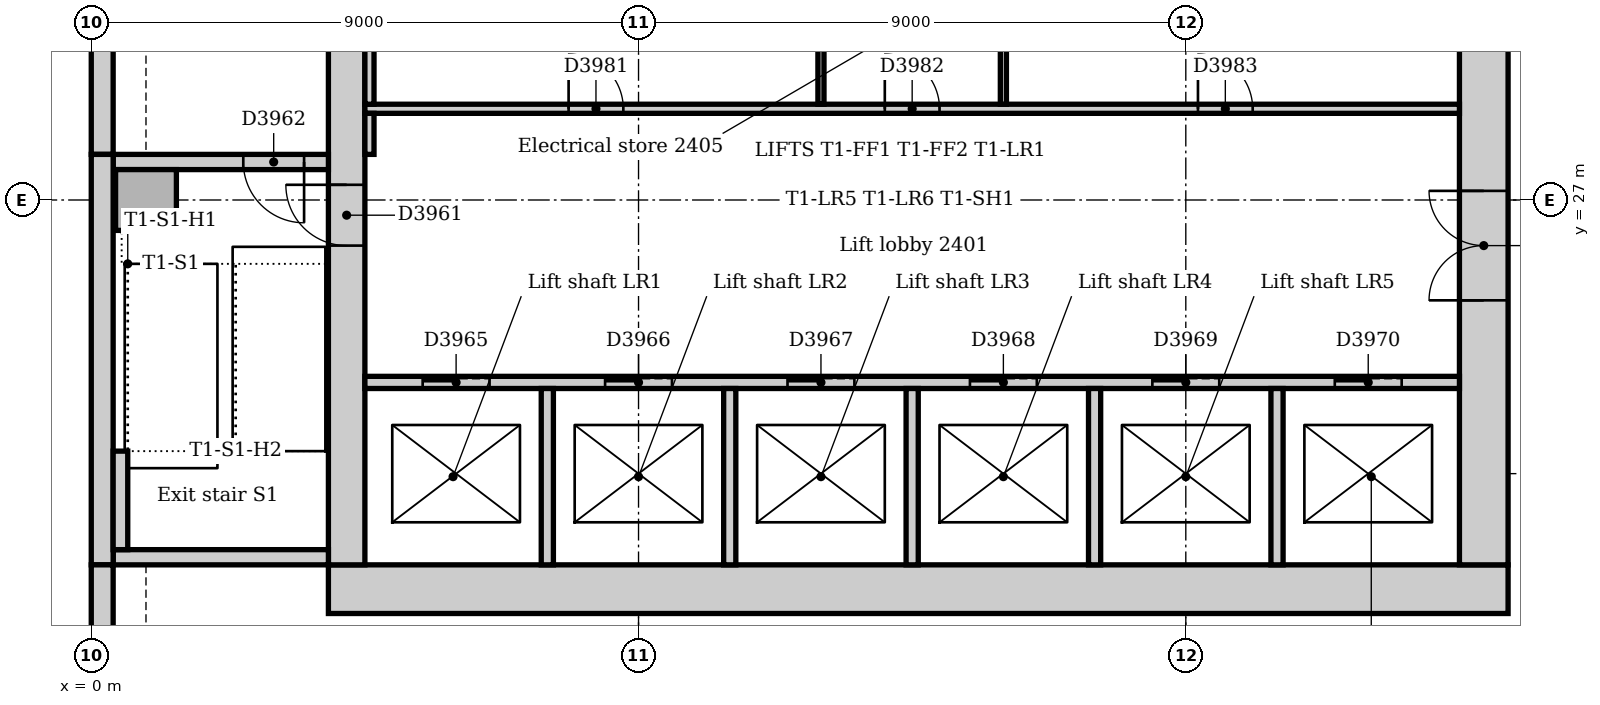
"""IFC4 building model, lengths in metres.
Left out: names, types, materials, properties, quantities, classifications, styles, units other than length and angle.
Written with IfcOpenShell. Run it as: python <this file> out.ifc"""

import sys

from ifc_helpers import new_model, si_unit, direction, frame, frame_2d, origin, origin_2d, place, context, subcontext, project, spatial, rectangle, extrude, element, fill, save


model = new_model("IFC4")
c1 = context("Model", 3, precision=1e-05, world=origin(), true_north=direction((0.0, 1.0)))
c2 = subcontext(c1, "Body", "Model", "MODEL_VIEW")
j1 = project(units=[si_unit("LENGTHUNIT", "METRE"), si_unit("PLANEANGLEUNIT", "RADIAN")], contexts=[c1])
p1 = place(None, origin())
s1 = spatial("IfcSite", under=j1, at=p1, CompositionType="ELEMENT")
p2 = place(p1, origin())
s2 = spatial("IfcBuilding", under=s1, at=p2, CompositionType="ELEMENT")
p3 = place(p2, frame((0.0, 0.0, 104.0)))
s3 = spatial("IfcBuildingStorey", under=s2, at=p3, CompositionType="ELEMENT", Elevation=104.0)
p4 = place(p3, frame((3.9, 20.6, 0.0), z_axis=(0.0, 0.0, 1.0), x_axis=(1.0, 0.0, 0.0)))
e1 = element("IfcWall", 1, at=p4, inside=s3, PredefinedType="SOLIDWALL", context=c2, shape_type="SweptSolid", body=[
    extrude(rectangle(XDim=19.4, YDim=0.8, at=frame_2d((9.7, 0.0))), origin(), (0.0, 0.0, 1.0), 4.0),
])
p5 = place(p3, frame((22.9, 21.0, 0.0), z_axis=(0.0, 0.0, 1.0), x_axis=(0.0, 1.0, 0.0)))
e2 = element("IfcWall", 2, at=p5, inside=s3, PredefinedType="SOLIDWALL", context=c2, shape_type="SweptSolid", body=[
    extrude(rectangle(XDim=10.5, YDim=0.8, at=frame_2d((5.25, 0.0))), origin(), (0.0, 0.0, 1.0), 4.0),
])
p6 = place(p5, frame((4.35, 0.0, 0.0)))
e3 = element("IfcOpeningElement", 3, at=p6, cuts=e2, PredefinedType="OPENING", context=c2, shape_type="SweptSolid", body=[
    extrude(rectangle(XDim=1.8, YDim=2.1, at=frame_2d((0.9, 1.05))), frame((0.0, 0.41, 0.0), z_axis=(0.0, -1.0, 0.0), x_axis=(1.0, 0.0, 0.0)), (0.0, 0.0, 1.0), 0.82),
])
p7 = place(p3, frame((4.2, 31.5, 0.0), z_axis=(0.0, 0.0, 1.0), x_axis=(0.0, -1.0, 0.0)))
e4 = element("IfcWall", 4, at=p7, inside=s3, PredefinedType="SOLIDWALL", context=c2, shape_type="SweptSolid", body=[
    extrude(rectangle(XDim=10.5, YDim=0.6, at=frame_2d((5.25, 0.0))), origin(), (0.0, 0.0, 1.0), 4.0),
])
p8 = place(p7, frame((4.25, 0.0, 0.0)))
e5 = element("IfcOpeningElement", 5, at=p8, cuts=e4, PredefinedType="OPENING", context=c2, shape_type="SweptSolid", body=[
    extrude(rectangle(XDim=1.0, YDim=2.1, at=frame_2d((0.5, 1.05))), frame((0.0, 0.31, 0.0), z_axis=(0.0, -1.0, 0.0), x_axis=(1.0, 0.0, 0.0)), (0.0, 0.0, 1.0), 0.62),
])
p9 = place(p3, frame((0.36, 21.125, 0.0), z_axis=(0.0, 0.0, 1.0), x_axis=(1.0, 0.0, 0.0)))
e6 = element("IfcWall", 6, at=p9, inside=s3, PredefinedType="SOLIDWALL", context=c2, shape_type="SweptSolid", body=[
    extrude(rectangle(XDim=3.54, YDim=0.25, at=frame_2d((1.77, 0.0))), origin(), (0.0, 0.0, 1.0), 4.0),
])
p10 = place(p3, frame((3.9, 27.625, 0.0), z_axis=(0.0, 0.0, 1.0), x_axis=(-1.0, 0.0, 0.0)))
e7 = element("IfcWall", 7, at=p10, inside=s3, PredefinedType="SOLIDWALL", context=c2, shape_type="SweptSolid", body=[
    extrude(rectangle(XDim=3.54, YDim=0.25, at=frame_2d((1.77, 0.0))), origin(), (0.0, 0.0, 1.0), 4.0),
])
p11 = place(p10, frame((0.4, 0.0, 0.0)))
e8 = element("IfcOpeningElement", 8, at=p11, cuts=e7, PredefinedType="OPENING", context=c2, shape_type="SweptSolid", body=[
    extrude(rectangle(XDim=1.0, YDim=2.1, at=frame_2d((0.5, 1.05))), frame((0.0, 0.135, 0.0), z_axis=(0.0, -1.0, 0.0), x_axis=(1.0, 0.0, 0.0)), (0.0, 0.0, 1.0), 0.27),
])
p12 = place(p3, frame((0.9, 27.0, 0.0), z_axis=(0.0, 0.0, 1.0), x_axis=(1.0, 0.0, 0.0)))
e9 = element("IfcColumn", 9, at=p12, inside=s3, PredefinedType="COLUMN", context=c2, shape_type="SweptSolid", body=[
    extrude(rectangle(XDim=1.0, YDim=1.0, at=origin_2d()), origin(), (0.0, 0.0, 1.0), 4.0),
])
p13 = place(p3, frame((0.18, 35.25, 0.0), z_axis=(0.0, 0.0, 1.0), x_axis=(0.0, -1.0, 0.0)))
e10 = element("IfcWall", 10, at=p13, inside=s3, PredefinedType="STANDARD", context=c2, shape_type="SweptSolid", body=[
    extrude(rectangle(XDim=7.5, YDim=0.36, at=frame_2d((3.75, 0.0))), origin(), (0.0, 0.0, 1.0), 3.85),
])
p14 = place(p3, frame((0.18, 27.75, 0.0), z_axis=(0.0, 0.0, 1.0), x_axis=(0.0, -1.0, 0.0)))
e11 = element("IfcWall", 11, at=p14, inside=s3, PredefinedType="STANDARD", context=c2, shape_type="SweptSolid", body=[
    extrude(rectangle(XDim=6.75, YDim=0.36, at=frame_2d((3.375, 0.0))), origin(), (0.0, 0.0, 1.0), 3.85),
])
p15 = place(p3, frame((0.18, 21.0, 0.0), z_axis=(0.0, 0.0, 1.0), x_axis=(0.0, -1.0, 0.0)))
e12 = element("IfcWall", 12, at=p15, inside=s3, PredefinedType="STANDARD", context=c2, shape_type="SweptSolid", body=[
    extrude(rectangle(XDim=12.257, YDim=0.36, at=frame_2d((6.129, 0.0))), origin(), (0.0, 0.0, 1.0), 3.85),
])
p16 = place(p15, frame((1.35, 0.0, 0.9)))
e13 = element("IfcOpeningElement", 13, at=p16, cuts=e12, PredefinedType="OPENING", context=c2, shape_type="SweptSolid", body=[
    extrude(rectangle(XDim=3.3, YDim=1.6, at=frame_2d((1.65, 0.8))), frame((0.0, 0.19, 0.0), z_axis=(0.0, -1.0, 0.0), x_axis=(1.0, 0.0, 0.0)), (0.0, 0.0, 1.0), 0.38),
])
p17 = place(p15, frame((5.85, 0.0, 0.9)))
e14 = element("IfcOpeningElement", 14, at=p17, cuts=e12, PredefinedType="OPENING", context=c2, shape_type="SweptSolid", body=[
    extrude(rectangle(XDim=3.3, YDim=1.6, at=frame_2d((1.65, 0.8))), frame((0.0, 0.19, 0.0), z_axis=(0.0, -1.0, 0.0), x_axis=(1.0, 0.0, 0.0)), (0.0, 0.0, 1.0), 0.38),
])
p18 = place(p3, frame((0.48, 21.25, 0.0), z_axis=(0.0, 0.0, 1.0), x_axis=(0.0, 1.0, 0.0)))
e15 = element("IfcWall", 15, at=p18, inside=s3, PredefinedType="STANDARD", context=c2, shape_type="SweptSolid", body=[
    extrude(rectangle(XDim=1.62, YDim=0.24, at=frame_2d((0.81, 0.0))), origin(), (0.0, 0.0, 1.0), 4.0),
])
p19 = place(p3, frame((4.5, 24.0, 0.0), z_axis=(0.0, 0.0, 1.0), x_axis=(1.0, 0.0, 0.0)))
e16 = element("IfcWall", 16, at=p19, inside=s3, PredefinedType="PARTITIONING", context=c2, shape_type="SweptSolid", body=[
    extrude(rectangle(XDim=18.0, YDim=0.2, at=frame_2d((9.0, 0.0))), origin(), (0.0, 0.0, 1.0), 3.85),
])
p20 = place(p19, frame((0.95, 0.0, 0.0)))
e17 = element("IfcOpeningElement", 17, at=p20, cuts=e16, PredefinedType="OPENING", context=c2, shape_type="SweptSolid", body=[
    extrude(rectangle(XDim=1.1, YDim=2.1, at=frame_2d((0.55, 1.05))), frame((0.0, 0.11, 0.0), z_axis=(0.0, -1.0, 0.0), x_axis=(1.0, 0.0, 0.0)), (0.0, 0.0, 1.0), 0.22),
])
p21 = place(p19, frame((3.95, 0.0, 0.0)))
e18 = element("IfcOpeningElement", 18, at=p21, cuts=e16, PredefinedType="OPENING", context=c2, shape_type="SweptSolid", body=[
    extrude(rectangle(XDim=1.1, YDim=2.1, at=frame_2d((0.55, 1.05))), frame((0.0, 0.11, 0.0), z_axis=(0.0, -1.0, 0.0), x_axis=(1.0, 0.0, 0.0)), (0.0, 0.0, 1.0), 0.22),
])
p22 = place(p19, frame((6.95, 0.0, 0.0)))
e19 = element("IfcOpeningElement", 19, at=p22, cuts=e16, PredefinedType="OPENING", context=c2, shape_type="SweptSolid", body=[
    extrude(rectangle(XDim=1.1, YDim=2.1, at=frame_2d((0.55, 1.05))), frame((0.0, 0.11, 0.0), z_axis=(0.0, -1.0, 0.0), x_axis=(1.0, 0.0, 0.0)), (0.0, 0.0, 1.0), 0.22),
])
p23 = place(p19, frame((9.95, 0.0, 0.0)))
e20 = element("IfcOpeningElement", 20, at=p23, cuts=e16, PredefinedType="OPENING", context=c2, shape_type="SweptSolid", body=[
    extrude(rectangle(XDim=1.1, YDim=2.1, at=frame_2d((0.55, 1.05))), frame((0.0, 0.11, 0.0), z_axis=(0.0, -1.0, 0.0), x_axis=(1.0, 0.0, 0.0)), (0.0, 0.0, 1.0), 0.22),
])
p24 = place(p19, frame((12.95, 0.0, 0.0)))
e21 = element("IfcOpeningElement", 21, at=p24, cuts=e16, PredefinedType="OPENING", context=c2, shape_type="SweptSolid", body=[
    extrude(rectangle(XDim=1.1, YDim=2.1, at=frame_2d((0.55, 1.05))), frame((0.0, 0.11, 0.0), z_axis=(0.0, -1.0, 0.0), x_axis=(1.0, 0.0, 0.0)), (0.0, 0.0, 1.0), 0.22),
])
p25 = place(p19, frame((15.95, 0.0, 0.0)))
e22 = element("IfcOpeningElement", 22, at=p25, cuts=e16, PredefinedType="OPENING", context=c2, shape_type="SweptSolid", body=[
    extrude(rectangle(XDim=1.1, YDim=2.1, at=frame_2d((0.55, 1.05))), frame((0.0, 0.11, 0.0), z_axis=(0.0, -1.0, 0.0), x_axis=(1.0, 0.0, 0.0)), (0.0, 0.0, 1.0), 0.22),
])
for number, where, z_axis, x_axis in (
    (23, (7.5, 21.0, 0.0), (0.0, 0.0, 1.0), (0.0, 1.0, 0.0)),
    (24, (10.5, 21.0, 0.0), (0.0, 0.0, 1.0), (0.0, 1.0, 0.0)),
    (25, (13.5, 21.0, 0.0), (0.0, 0.0, 1.0), (0.0, 1.0, 0.0)),
    (26, (16.5, 21.0, 0.0), (0.0, 0.0, 1.0), (0.0, 1.0, 0.0)),
    (27, (19.5, 21.0, 0.0), (0.0, 0.0, 1.0), (0.0, 1.0, 0.0)),
):
    element("IfcWall", number, at=place(p3, frame(where, z_axis=z_axis, x_axis=x_axis)), inside=s3, PredefinedType="PARTITIONING", context=c2, shape_type="SweptSolid", body=[
        extrude(rectangle(XDim=2.9, YDim=0.2, at=frame_2d((1.45, 0.0))), origin(), (0.0, 0.0, 1.0), 3.85),
    ])
p26 = place(p3, frame((4.5, 28.5, 0.0), z_axis=(0.0, 0.0, 1.0), x_axis=(1.0, 0.0, 0.0)))
e28 = element("IfcWall", 28, at=p26, inside=s3, PredefinedType="PARTITIONING", context=c2, shape_type="SweptSolid", body=[
    extrude(rectangle(XDim=18.0, YDim=0.15, at=frame_2d((9.0, 0.0))), origin(), (0.0, 0.0, 1.0), 3.85),
])
p27 = place(p26, frame((3.35, 0.0, 0.0)))
e29 = element("IfcOpeningElement", 29, at=p27, cuts=e28, PredefinedType="OPENING", context=c2, shape_type="SweptSolid", body=[
    extrude(rectangle(XDim=0.9, YDim=2.1, at=frame_2d((0.45, 1.05))), frame((0.0, 0.085, 0.0), z_axis=(0.0, -1.0, 0.0), x_axis=(1.0, 0.0, 0.0)), (0.0, 0.0, 1.0), 0.17),
])
p28 = place(p26, frame((8.55, 0.0, 0.0)))
e30 = element("IfcOpeningElement", 30, at=p28, cuts=e28, PredefinedType="OPENING", context=c2, shape_type="SweptSolid", body=[
    extrude(rectangle(XDim=0.9, YDim=2.1, at=frame_2d((0.45, 1.05))), frame((0.0, 0.085, 0.0), z_axis=(0.0, -1.0, 0.0), x_axis=(1.0, 0.0, 0.0)), (0.0, 0.0, 1.0), 0.17),
])
p29 = place(p26, frame((13.7, 0.0, 0.0)))
e31 = element("IfcOpeningElement", 31, at=p29, cuts=e28, PredefinedType="OPENING", context=c2, shape_type="SweptSolid", body=[
    extrude(rectangle(XDim=0.9, YDim=2.1, at=frame_2d((0.45, 1.05))), frame((0.0, 0.085, 0.0), z_axis=(0.0, -1.0, 0.0), x_axis=(1.0, 0.0, 0.0)), (0.0, 0.0, 1.0), 0.17),
])
p30 = place(p3, frame((4.575, 27.75, 0.0), z_axis=(0.0, 0.0, 1.0), x_axis=(0.0, 1.0, 0.0)))
e32 = element("IfcWall", 32, at=p30, inside=s3, PredefinedType="PARTITIONING", context=c2, shape_type="SweptSolid", body=[
    extrude(rectangle(XDim=0.675, YDim=0.15, at=frame_2d((0.338, 0.0))), origin(), (0.0, 0.0, 1.0), 3.85),
])
p31 = place(p3, frame((4.575, 28.575, 0.0), z_axis=(0.0, 0.0, 1.0), x_axis=(0.0, 1.0, 0.0)))
e33 = element("IfcWall", 33, at=p31, inside=s3, PredefinedType="PARTITIONING", context=c2, shape_type="SweptSolid", body=[
    extrude(rectangle(XDim=2.675, YDim=0.15, at=frame_2d((1.337, 0.0))), origin(), (0.0, 0.0, 1.0), 3.85),
])
for number, where, z_axis, x_axis in (
    (34, (12.0, 28.575, 0.0), (0.0, 0.0, 1.0), (0.0, 1.0, 0.0)),
    (35, (15.0, 28.575, 0.0), (0.0, 0.0, 1.0), (0.0, 1.0, 0.0)),
):
    element("IfcWall", number, at=place(p3, frame(where, z_axis=z_axis, x_axis=x_axis)), inside=s3, PredefinedType="PARTITIONING", context=c2, shape_type="SweptSolid", body=[
        extrude(rectangle(XDim=2.675, YDim=0.1, at=frame_2d((1.337, 0.0))), origin(), (0.0, 0.0, 1.0), 3.85),
    ])
p32 = place(p8, frame((1.0, 0.0, 0.0), z_axis=(0.0, 0.0, 1.0), x_axis=(-1.0, 0.0, 0.0)))
e36 = element("IfcDoor", 36, at=p32, inside=s3, OperationType="SINGLE_SWING_RIGHT", PredefinedType="DOOR", context=c2, shape_type="SweptSolid", body=[
    extrude(rectangle(XDim=1.0, YDim=2.1, at=frame_2d((0.5, 1.05))), frame((0.0, 0.025, 0.0), z_axis=(0.0, -1.0, 0.0), x_axis=(1.0, 0.0, 0.0)), (0.0, 0.0, 1.0), 0.05),
])
fill(e5, e36)
p33 = place(p11, origin())
e37 = element("IfcDoor", 37, at=p33, inside=s3, OperationType="SINGLE_SWING_LEFT", PredefinedType="DOOR", context=c2, shape_type="SweptSolid", body=[
    extrude(rectangle(XDim=1.0, YDim=2.1, at=frame_2d((0.5, 1.05))), frame((0.0, 0.025, 0.0), z_axis=(0.0, -1.0, 0.0), x_axis=(1.0, 0.0, 0.0)), (0.0, 0.0, 1.0), 0.05),
])
fill(e8, e37)
p34 = place(p20, origin())
e38 = element("IfcDoor", 38, at=p34, inside=s3, OperationType="SLIDING_TO_LEFT", PredefinedType="DOOR", context=c2, shape_type="SweptSolid", body=[
    extrude(rectangle(XDim=1.1, YDim=2.1, at=frame_2d((0.55, 1.05))), frame((0.0, 0.025, 0.0), z_axis=(0.0, -1.0, 0.0), x_axis=(1.0, 0.0, 0.0)), (0.0, 0.0, 1.0), 0.05),
])
fill(e17, e38)
p35 = place(p21, origin())
e39 = element("IfcDoor", 39, at=p35, inside=s3, OperationType="SLIDING_TO_LEFT", PredefinedType="DOOR", context=c2, shape_type="SweptSolid", body=[
    extrude(rectangle(XDim=1.1, YDim=2.1, at=frame_2d((0.55, 1.05))), frame((0.0, 0.025, 0.0), z_axis=(0.0, -1.0, 0.0), x_axis=(1.0, 0.0, 0.0)), (0.0, 0.0, 1.0), 0.05),
])
fill(e18, e39)
p36 = place(p22, origin())
e40 = element("IfcDoor", 40, at=p36, inside=s3, OperationType="SLIDING_TO_LEFT", PredefinedType="DOOR", context=c2, shape_type="SweptSolid", body=[
    extrude(rectangle(XDim=1.1, YDim=2.1, at=frame_2d((0.55, 1.05))), frame((0.0, 0.025, 0.0), z_axis=(0.0, -1.0, 0.0), x_axis=(1.0, 0.0, 0.0)), (0.0, 0.0, 1.0), 0.05),
])
fill(e19, e40)
p37 = place(p23, origin())
e41 = element("IfcDoor", 41, at=p37, inside=s3, OperationType="SLIDING_TO_LEFT", PredefinedType="DOOR", context=c2, shape_type="SweptSolid", body=[
    extrude(rectangle(XDim=1.1, YDim=2.1, at=frame_2d((0.55, 1.05))), frame((0.0, 0.025, 0.0), z_axis=(0.0, -1.0, 0.0), x_axis=(1.0, 0.0, 0.0)), (0.0, 0.0, 1.0), 0.05),
])
fill(e20, e41)
p38 = place(p24, origin())
e42 = element("IfcDoor", 42, at=p38, inside=s3, OperationType="SLIDING_TO_LEFT", PredefinedType="DOOR", context=c2, shape_type="SweptSolid", body=[
    extrude(rectangle(XDim=1.1, YDim=2.1, at=frame_2d((0.55, 1.05))), frame((0.0, 0.025, 0.0), z_axis=(0.0, -1.0, 0.0), x_axis=(1.0, 0.0, 0.0)), (0.0, 0.0, 1.0), 0.05),
])
fill(e21, e42)
p39 = place(p25, origin())
e43 = element("IfcDoor", 43, at=p39, inside=s3, OperationType="SLIDING_TO_LEFT", PredefinedType="DOOR", context=c2, shape_type="SweptSolid", body=[
    extrude(rectangle(XDim=1.1, YDim=2.1, at=frame_2d((0.55, 1.05))), frame((0.0, 0.025, 0.0), z_axis=(0.0, -1.0, 0.0), x_axis=(1.0, 0.0, 0.0)), (0.0, 0.0, 1.0), 0.05),
])
fill(e22, e43)
p40 = place(p6, origin())
e44 = element("IfcDoor", 44, at=p40, inside=s3, OperationType="DOUBLE_DOOR_DOUBLE_SWING", PredefinedType="DOOR", context=c2, shape_type="SweptSolid", body=[
    extrude(rectangle(XDim=1.8, YDim=2.1, at=frame_2d((0.9, 1.05))), frame((0.0, 0.025, 0.0), z_axis=(0.0, -1.0, 0.0), x_axis=(1.0, 0.0, 0.0)), (0.0, 0.0, 1.0), 0.05),
])
fill(e3, e44)
p41 = place(p27, origin())
e45 = element("IfcDoor", 45, at=p41, inside=s3, OperationType="SINGLE_SWING_LEFT", PredefinedType="DOOR", context=c2, shape_type="SweptSolid", body=[
    extrude(rectangle(XDim=0.9, YDim=2.1, at=frame_2d((0.45, 1.05))), frame((0.0, 0.025, 0.0), z_axis=(0.0, -1.0, 0.0), x_axis=(1.0, 0.0, 0.0)), (0.0, 0.0, 1.0), 0.05),
])
fill(e29, e45)
p42 = place(p28, origin())
e46 = element("IfcDoor", 46, at=p42, inside=s3, OperationType="SINGLE_SWING_LEFT", PredefinedType="DOOR", context=c2, shape_type="SweptSolid", body=[
    extrude(rectangle(XDim=0.9, YDim=2.1, at=frame_2d((0.45, 1.05))), frame((0.0, 0.025, 0.0), z_axis=(0.0, -1.0, 0.0), x_axis=(1.0, 0.0, 0.0)), (0.0, 0.0, 1.0), 0.05),
])
fill(e30, e46)
p43 = place(p29, origin())
e47 = element("IfcDoor", 47, at=p43, inside=s3, OperationType="SINGLE_SWING_LEFT", PredefinedType="DOOR", context=c2, shape_type="SweptSolid", body=[
    extrude(rectangle(XDim=0.9, YDim=2.1, at=frame_2d((0.45, 1.05))), frame((0.0, 0.025, 0.0), z_axis=(0.0, -1.0, 0.0), x_axis=(1.0, 0.0, 0.0)), (0.0, 0.0, 1.0), 0.05),
])
fill(e31, e47)
save(model, sys.argv[1])
